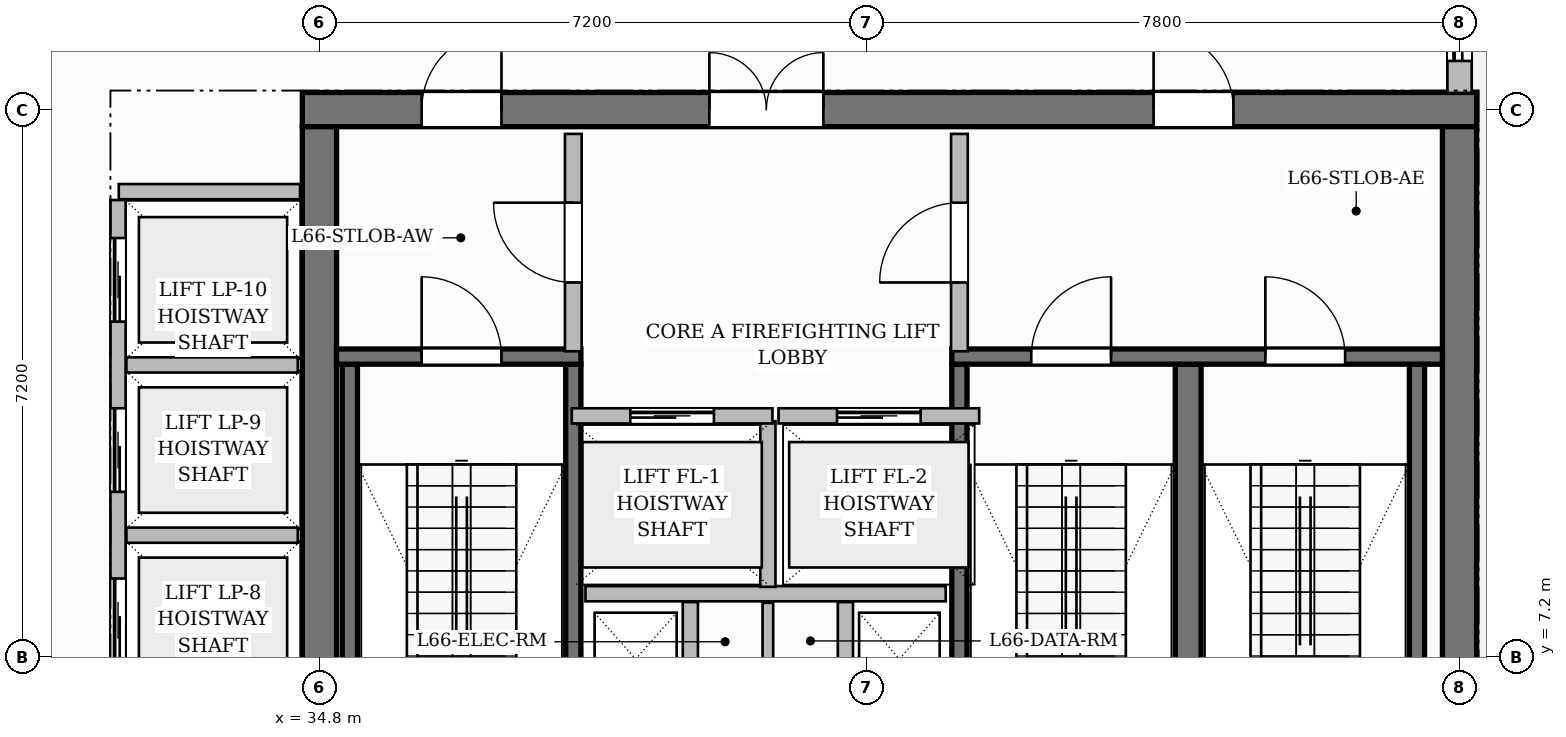
"""IFC4 building model, lengths in metres.
Left out: names, types, materials, properties, quantities, classifications, styles, units other than length and angle.
Written with IfcOpenShell. Run it as: python <this file> out.ifc"""

import sys

from ifc_helpers import new_model, si_unit, direction, frame, frame_2d, origin, place, context, subcontext, project, spatial, rectangle, extrude, source, transform, mapped, element, fill, save


model = new_model("IFC4")
c1 = context("Model", 3, precision=1e-05, world=origin(), true_north=direction((0.0, 1.0)))
c2 = subcontext(c1, "Body", "Model", "MODEL_VIEW")
j1 = project(units=[si_unit("LENGTHUNIT", "METRE"), si_unit("PLANEANGLEUNIT", "RADIAN")], contexts=[c1])
p1 = place(None, origin())
s1 = spatial("IfcSite", under=j1, at=p1, CompositionType="ELEMENT")
p2 = place(p1, origin())
s2 = spatial("IfcBuilding", under=s1, at=p2, CompositionType="ELEMENT")
p3 = place(p2, frame((0.0, 0.0, 263.5)))
s3 = spatial("IfcBuildingStorey", under=s2, at=p3, CompositionType="ELEMENT", Elevation=263.5)
p4 = place(p3, frame((34.575, 14.4, 0.0), z_axis=(0.0, 0.0, 1.0), x_axis=(1.0, 0.0, 0.0)))
e1 = element("IfcWall", 1, at=p4, inside=s3, PredefinedType="SHEAR", context=c2, shape_type="SweptSolid", body=[
    extrude(rectangle(XDim=15.45, YDim=0.45, at=frame_2d((7.725, 0.0))), origin(), (0.0, 0.0, 1.0), 3.85),
])
p5 = place(p4, frame((5.355, 0.0, 0.0)))
e2 = element("IfcOpeningElement", 2, at=p5, cuts=e1, PredefinedType="OPENING", context=c2, shape_type="SweptSolid", body=[
    extrude(rectangle(XDim=1.5, YDim=2.2, at=frame_2d((0.75, 1.1))), frame((0.0, 0.235, 0.0), z_axis=(0.0, -1.0, 0.0), x_axis=(1.0, 0.0, 0.0)), (0.0, 0.0, 1.0), 0.47),
])
p6 = place(p4, frame((1.57, 0.0, 0.0)))
e3 = element("IfcOpeningElement", 3, at=p6, cuts=e1, PredefinedType="OPENING", context=c2, shape_type="SweptSolid", body=[
    extrude(rectangle(XDim=1.05, YDim=2.15, at=frame_2d((0.525, 1.075))), frame((0.0, 0.235, 0.0), z_axis=(0.0, -1.0, 0.0), x_axis=(1.0, 0.0, 0.0)), (0.0, 0.0, 1.0), 0.47),
])
p7 = place(p4, frame((11.2, 0.0, 0.0)))
e4 = element("IfcOpeningElement", 4, at=p7, cuts=e1, PredefinedType="OPENING", context=c2, shape_type="SweptSolid", body=[
    extrude(rectangle(XDim=1.05, YDim=2.15, at=frame_2d((0.525, 1.075))), frame((0.0, 0.235, 0.0), z_axis=(0.0, -1.0, 0.0), x_axis=(1.0, 0.0, 0.0)), (0.0, 0.0, 1.0), 0.47),
])
for number, where, z_axis, x_axis in (
    (5, (34.8, 3.825, 0.0), (0.0, 0.0, 1.0), (0.0, 1.0, 0.0)),
    (6, (49.8, 3.825, 0.0), (0.0, 0.0, 1.0), (0.0, 1.0, 0.0)),
):
    element("IfcWall", number, at=place(p3, frame(where, z_axis=z_axis, x_axis=x_axis)), inside=s3, PredefinedType="SHEAR", context=c2, shape_type="SweptSolid", body=[
        extrude(rectangle(XDim=10.35, YDim=0.45, at=frame_2d((5.175, 0.0))), origin(), (0.0, 0.0, 1.0), 3.85),
    ])
for number, where, z_axis, x_axis in (
    (7, (35.2, 4.1, 0.0), (0.0, 0.0, 1.0), (0.0, 1.0, 0.0)),
    (8, (38.14, 4.1, 0.0), (0.0, 0.0, 1.0), (0.0, 1.0, 0.0)),
):
    element("IfcWall", number, at=place(p3, frame(where, z_axis=z_axis, x_axis=x_axis)), inside=s3, PredefinedType="SHEAR", context=c2, shape_type="SweptSolid", body=[
        extrude(rectangle(XDim=6.95, YDim=0.2, at=frame_2d((3.475, 0.0))), origin(), (0.0, 0.0, 1.0), 3.85),
    ])
p8 = place(p3, frame((35.025, 11.15, 0.0), z_axis=(0.0, 0.0, 1.0), x_axis=(1.0, 0.0, 0.0)))
e9 = element("IfcWall", 9, at=p8, inside=s3, PredefinedType="SHEAR", context=c2, shape_type="SweptSolid", body=[
    extrude(rectangle(XDim=3.215, YDim=0.2, at=frame_2d((1.607, 0.0))), origin(), (0.0, 0.0, 1.0), 3.85),
])
p9 = place(p8, frame((1.12, 0.0, 0.0)))
e10 = element("IfcOpeningElement", 10, at=p9, cuts=e9, PredefinedType="OPENING", context=c2, shape_type="SweptSolid", body=[
    extrude(rectangle(XDim=1.05, YDim=2.2, at=frame_2d((0.525, 1.1))), frame((0.0, 0.11, 0.0), z_axis=(0.0, -1.0, 0.0), x_axis=(1.0, 0.0, 0.0)), (0.0, 0.0, 1.0), 0.22),
])
p10 = place(p3, frame((43.22, 4.1, 0.0), z_axis=(0.0, 0.0, 1.0), x_axis=(0.0, 1.0, 0.0)))
e11 = element("IfcWall", 11, at=p10, inside=s3, PredefinedType="SHEAR", context=c2, shape_type="SweptSolid", body=[
    extrude(rectangle(XDim=6.95, YDim=0.2, at=frame_2d((3.475, 0.0))), origin(), (0.0, 0.0, 1.0), 3.85),
])
p11 = place(p3, frame((46.23, 4.1, 0.0), z_axis=(0.0, 0.0, 1.0), x_axis=(0.0, 1.0, 0.0)))
e12 = element("IfcWall", 12, at=p11, inside=s3, PredefinedType="SHEAR", context=c2, shape_type="SweptSolid", body=[
    extrude(rectangle(XDim=6.95, YDim=0.34, at=frame_2d((3.475, 0.0))), origin(), (0.0, 0.0, 1.0), 3.85),
])
p12 = place(p3, frame((49.24, 4.1, 0.0), z_axis=(0.0, 0.0, 1.0), x_axis=(0.0, 1.0, 0.0)))
e13 = element("IfcWall", 13, at=p12, inside=s3, PredefinedType="SHEAR", context=c2, shape_type="SweptSolid", body=[
    extrude(rectangle(XDim=6.95, YDim=0.2, at=frame_2d((3.475, 0.0))), origin(), (0.0, 0.0, 1.0), 3.85),
])
p13 = place(p3, frame((43.12, 11.15, 0.0), z_axis=(0.0, 0.0, 1.0), x_axis=(1.0, 0.0, 0.0)))
e14 = element("IfcWall", 14, at=p13, inside=s3, PredefinedType="SHEAR", context=c2, shape_type="SweptSolid", body=[
    extrude(rectangle(XDim=6.455, YDim=0.2, at=frame_2d((3.228, 0.0))), origin(), (0.0, 0.0, 1.0), 3.85),
])
p14 = place(p13, frame((1.045, 0.0, 0.0)))
e15 = element("IfcOpeningElement", 15, at=p14, cuts=e14, PredefinedType="OPENING", context=c2, shape_type="SweptSolid", body=[
    extrude(rectangle(XDim=1.05, YDim=2.2, at=frame_2d((0.525, 1.1))), frame((0.0, 0.11, 0.0), z_axis=(0.0, -1.0, 0.0), x_axis=(1.0, 0.0, 0.0)), (0.0, 0.0, 1.0), 0.22),
])
p15 = place(p13, frame((4.125, 0.0, 0.0)))
e16 = element("IfcOpeningElement", 16, at=p15, cuts=e14, PredefinedType="OPENING", context=c2, shape_type="SweptSolid", body=[
    extrude(rectangle(XDim=1.05, YDim=2.2, at=frame_2d((0.525, 1.1))), frame((0.0, 0.11, 0.0), z_axis=(0.0, -1.0, 0.0), x_axis=(1.0, 0.0, 0.0)), (0.0, 0.0, 1.0), 0.22),
])
p16 = place(p3, frame((38.3, 8.03, 0.0), z_axis=(0.0, 0.0, 1.0), x_axis=(1.0, 0.0, 0.0)))
e17 = element("IfcWall", 17, at=p16, inside=s3, PredefinedType="PARTITIONING", context=c2, shape_type="SweptSolid", body=[
    extrude(rectangle(XDim=4.74, YDim=0.2, at=frame_2d((2.37, 0.0))), origin(), (0.0, 0.0, 1.0), 3.6),
])
p17 = place(p3, frame((40.7, 8.12, 0.0), z_axis=(0.0, 0.0, 1.0), x_axis=(0.0, 1.0, 0.0)))
e18 = element("IfcWall", 18, at=p17, inside=s3, PredefinedType="PARTITIONING", context=c2, shape_type="SweptSolid", body=[
    extrude(rectangle(XDim=2.18, YDim=0.2, at=frame_2d((1.09, 0.0))), origin(), (0.0, 0.0, 1.0), 3.6),
])
p18 = place(p3, frame((38.14, 11.22, 0.0), z_axis=(0.0, 0.0, 1.0), x_axis=(0.0, 1.0, 0.0)))
e19 = element("IfcWall", 19, at=p18, inside=s3, PredefinedType="PARTITIONING", context=c2, shape_type="SweptSolid", body=[
    extrude(rectangle(XDim=2.86, YDim=0.22, at=frame_2d((1.43, 0.0))), origin(), (0.0, 0.0, 1.0), 3.6),
])
p19 = place(p18, frame((0.905, 0.0, 0.0)))
e20 = element("IfcOpeningElement", 20, at=p19, cuts=e19, PredefinedType="OPENING", context=c2, shape_type="SweptSolid", body=[
    extrude(rectangle(XDim=1.05, YDim=2.15, at=frame_2d((0.525, 1.075))), frame((0.0, 0.12, 0.0), z_axis=(0.0, -1.0, 0.0), x_axis=(1.0, 0.0, 0.0)), (0.0, 0.0, 1.0), 0.24),
])
p20 = place(p3, frame((43.22, 11.22, 0.0), z_axis=(0.0, 0.0, 1.0), x_axis=(0.0, 1.0, 0.0)))
e21 = element("IfcWall", 21, at=p20, inside=s3, PredefinedType="PARTITIONING", context=c2, shape_type="SweptSolid", body=[
    extrude(rectangle(XDim=2.86, YDim=0.22, at=frame_2d((1.43, 0.0))), origin(), (0.0, 0.0, 1.0), 3.6),
])
p21 = place(p20, frame((0.905, 0.0, 0.0)))
e22 = element("IfcOpeningElement", 22, at=p21, cuts=e21, PredefinedType="OPENING", context=c2, shape_type="SweptSolid", body=[
    extrude(rectangle(XDim=1.05, YDim=2.15, at=frame_2d((0.525, 1.075))), frame((0.0, 0.12, 0.0), z_axis=(0.0, -1.0, 0.0), x_axis=(1.0, 0.0, 0.0)), (0.0, 0.0, 1.0), 0.24),
])
for number, where, z_axis, x_axis in (
    (23, (39.68, 6.13, 0.0), (0.0, 0.0, 1.0), (0.0, 1.0, 0.0)),
    (24, (41.72, 6.13, 0.0), (0.0, 0.0, 1.0), (0.0, 1.0, 0.0)),
):
    element("IfcWall", number, at=place(p3, frame(where, z_axis=z_axis, x_axis=x_axis)), inside=s3, PredefinedType="PARTITIONING", context=c2, shape_type="SweptSolid", body=[
        extrude(rectangle(XDim=1.79, YDim=0.2, at=frame_2d((0.895, 0.0))), origin(), (0.0, 0.0, 1.0), 3.6),
    ])
p22 = place(p3, frame((40.7, 3.845, 0.0), z_axis=(0.0, 0.0, 1.0), x_axis=(0.0, 1.0, 0.0)))
e25 = element("IfcWall", 25, at=p22, inside=s3, PredefinedType="PARTITIONING", context=c2, shape_type="SweptSolid", body=[
    extrude(rectangle(XDim=4.065, YDim=0.14, at=frame_2d((2.032, 0.0))), origin(), (0.0, 0.0, 1.0), 3.6),
])
p23 = place(p3, frame((32.16, 13.32, 0.0), z_axis=(0.0, 0.0, 1.0), x_axis=(1.0, 0.0, 0.0)))
e26 = element("IfcWall", 26, at=p23, inside=s3, PredefinedType="PARTITIONING", context=c2, shape_type="SweptSolid", body=[
    extrude(rectangle(XDim=2.385, YDim=0.2, at=frame_2d((1.192, 0.0))), origin(), (0.0, 0.0, 1.0), 3.6),
])
p24 = place(p3, frame((32.15, 4.39, 0.0), z_axis=(0.0, 0.0, 1.0), x_axis=(0.0, 1.0, 0.0)))
e27 = element("IfcWall", 27, at=p24, inside=s3, PredefinedType="PARTITIONING", context=c2, shape_type="SweptSolid", body=[
    extrude(rectangle(XDim=8.82, YDim=0.2, at=frame_2d((4.41, 0.0))), origin(), (0.0, 0.0, 1.0), 3.6),
])
p25 = place(p24, frame((0.5, 0.0, 0.0)))
e28 = element("IfcOpeningElement", 28, at=p25, cuts=e27, PredefinedType="OPENING", context=c2, shape_type="SweptSolid", body=[
    extrude(rectangle(XDim=1.1, YDim=2.2, at=frame_2d((0.55, 1.1))), frame((0.0, 0.11, 0.0), z_axis=(0.0, -1.0, 0.0), x_axis=(1.0, 0.0, 0.0)), (0.0, 0.0, 1.0), 0.22),
])
p26 = place(p24, frame((2.74, 0.0, 0.0)))
e29 = element("IfcOpeningElement", 29, at=p26, cuts=e27, PredefinedType="OPENING", context=c2, shape_type="SweptSolid", body=[
    extrude(rectangle(XDim=1.1, YDim=2.2, at=frame_2d((0.55, 1.1))), frame((0.0, 0.11, 0.0), z_axis=(0.0, -1.0, 0.0), x_axis=(1.0, 0.0, 0.0)), (0.0, 0.0, 1.0), 0.22),
])
p27 = place(p24, frame((4.98, 0.0, 0.0)))
e30 = element("IfcOpeningElement", 30, at=p27, cuts=e27, PredefinedType="OPENING", context=c2, shape_type="SweptSolid", body=[
    extrude(rectangle(XDim=1.1, YDim=2.2, at=frame_2d((0.55, 1.1))), frame((0.0, 0.11, 0.0), z_axis=(0.0, -1.0, 0.0), x_axis=(1.0, 0.0, 0.0)), (0.0, 0.0, 1.0), 0.22),
])
p28 = place(p24, frame((7.22, 0.0, 0.0)))
e31 = element("IfcOpeningElement", 31, at=p28, cuts=e27, PredefinedType="OPENING", context=c2, shape_type="SweptSolid", body=[
    extrude(rectangle(XDim=1.1, YDim=2.2, at=frame_2d((0.55, 1.1))), frame((0.0, 0.11, 0.0), z_axis=(0.0, -1.0, 0.0), x_axis=(1.0, 0.0, 0.0)), (0.0, 0.0, 1.0), 0.22),
])
for number, where, z_axis, x_axis in (
    (32, (32.26, 8.8, 0.0), (0.0, 0.0, 1.0), (1.0, 0.0, 0.0)),
    (33, (32.26, 11.04, 0.0), (0.0, 0.0, 1.0), (1.0, 0.0, 0.0)),
):
    element("IfcWall", number, at=place(p3, frame(where, z_axis=z_axis, x_axis=x_axis)), inside=s3, PredefinedType="PARTITIONING", context=c2, shape_type="SweptSolid", body=[
        extrude(rectangle(XDim=2.255, YDim=0.2, at=frame_2d((1.127, 0.0))), origin(), (0.0, 0.0, 1.0), 3.6),
    ])
p29 = place(p3, frame((38.12, 10.37, 0.0), z_axis=(0.0, 0.0, 1.0), x_axis=(1.0, 0.0, 0.0)))
e34 = element("IfcWall", 34, at=p29, inside=s3, PredefinedType="PARTITIONING", context=c2, shape_type="SweptSolid", body=[
    extrude(rectangle(XDim=2.64, YDim=0.2, at=frame_2d((1.32, 0.0))), origin(), (0.0, 0.0, 1.0), 3.6),
])
p30 = place(p29, frame((0.77, 0.0, 0.0)))
e35 = element("IfcOpeningElement", 35, at=p30, cuts=e34, PredefinedType="OPENING", context=c2, shape_type="SweptSolid", body=[
    extrude(rectangle(XDim=1.1, YDim=2.2, at=frame_2d((0.55, 1.1))), frame((0.0, 0.11, 0.0), z_axis=(0.0, -1.0, 0.0), x_axis=(1.0, 0.0, 0.0)), (0.0, 0.0, 1.0), 0.22),
])
p31 = place(p3, frame((40.84, 10.37, 0.0), z_axis=(0.0, 0.0, 1.0), x_axis=(1.0, 0.0, 0.0)))
e36 = element("IfcWall", 36, at=p31, inside=s3, PredefinedType="PARTITIONING", context=c2, shape_type="SweptSolid", body=[
    extrude(rectangle(XDim=2.64, YDim=0.2, at=frame_2d((1.32, 0.0))), origin(), (0.0, 0.0, 1.0), 3.6),
])
p32 = place(p31, frame((0.77, 0.0, 0.0)))
e37 = element("IfcOpeningElement", 37, at=p32, cuts=e36, PredefinedType="OPENING", context=c2, shape_type="SweptSolid", body=[
    extrude(rectangle(XDim=1.1, YDim=2.2, at=frame_2d((0.55, 1.1))), frame((0.0, 0.11, 0.0), z_axis=(0.0, -1.0, 0.0), x_axis=(1.0, 0.0, 0.0)), (0.0, 0.0, 1.0), 0.22),
])
p33 = place(p3, frame((49.8, 14.62, 0.0), z_axis=(0.0, 0.0, 1.0), x_axis=(0.0, 1.0, 0.0)))
e38 = element("IfcWall", 38, at=p33, inside=s3, PredefinedType="SOLIDWALL", context=c2, shape_type="SweptSolid", body=[
    extrude(rectangle(XDim=6.93, YDim=0.32, at=frame_2d((3.465, 0.0))), origin(), (0.0, 0.0, 1.0), 3.185),
])
p34 = place(p33, frame((0.42, 0.0, 0.0)))
e39 = element("IfcOpeningElement", 39, at=p34, cuts=e38, PredefinedType="OPENING", context=c2, shape_type="SweptSolid", body=[
    extrude(rectangle(XDim=1.2, YDim=2.2, at=frame_2d((0.6, 1.1))), frame((0.0, 0.17, 0.0), z_axis=(0.0, -1.0, 0.0), x_axis=(1.0, 0.0, 0.0)), (0.0, 0.0, 1.0), 0.34),
])
p35 = place(p33, frame((3.659, 0.0, 0.8)))
e40 = element("IfcOpeningElement", 40, at=p35, cuts=e38, PredefinedType="OPENING", context=c2, shape_type="SweptSolid", body=[
    extrude(rectangle(XDim=1.8, YDim=1.85, at=frame_2d((0.9, 0.925))), frame((0.0, 0.17, 0.0), z_axis=(0.0, -1.0, 0.0), x_axis=(1.0, 0.0, 0.0)), (0.0, 0.0, 1.0), 0.34),
])
m1 = source(origin(), c2, "Body", "SweptSolid", [
    extrude(rectangle(XDim=1.05, YDim=2.2, at=frame_2d((0.525, 1.1))), frame((0.0, 0.025, 0.0), z_axis=(0.0, -1.0, 0.0), x_axis=(1.0, 0.0, 0.0)), (0.0, 0.0, 1.0), 0.05),
])
p36 = place(p9, origin())
e41 = element("IfcDoor", 41, at=p36, inside=s3, OperationType="SINGLE_SWING_LEFT", PredefinedType="DOOR", context=c2, shape_type="MappedRepresentation", body=[
    mapped(m1, transform((0.0, 0.0, 0.0), scale=1.0)),
])
fill(e10, e41)
p37 = place(p14, origin())
e42 = element("IfcDoor", 42, at=p37, inside=s3, OperationType="SINGLE_SWING_RIGHT", PredefinedType="DOOR", context=c2, shape_type="MappedRepresentation", body=[
    mapped(m1, transform((0.0, 0.0, 0.0), scale=1.0)),
])
fill(e15, e42)
p38 = place(p15, origin())
e43 = element("IfcDoor", 43, at=p38, inside=s3, OperationType="SINGLE_SWING_LEFT", PredefinedType="DOOR", context=c2, shape_type="MappedRepresentation", body=[
    mapped(m1, transform((0.0, 0.0, 0.0), scale=1.0)),
])
fill(e16, e43)
m2 = source(origin(), c2, "Body", "SweptSolid", [
    extrude(rectangle(XDim=1.05, YDim=2.15, at=frame_2d((0.525, 1.075))), frame((0.0, 0.025, 0.0), z_axis=(0.0, -1.0, 0.0), x_axis=(1.0, 0.0, 0.0)), (0.0, 0.0, 1.0), 0.05),
])
p39 = place(p19, origin())
e44 = element("IfcDoor", 44, at=p39, inside=s3, OperationType="SINGLE_SWING_RIGHT", PredefinedType="DOOR", context=c2, shape_type="MappedRepresentation", body=[
    mapped(m2, transform((0.0, 0.0, 0.0), scale=1.0)),
])
fill(e20, e44)
p40 = place(p21, origin())
e45 = element("IfcDoor", 45, at=p40, inside=s3, OperationType="SINGLE_SWING_LEFT", PredefinedType="DOOR", context=c2, shape_type="MappedRepresentation", body=[
    mapped(m2, transform((0.0, 0.0, 0.0), scale=1.0)),
])
fill(e22, e45)
m3 = source(origin(), c2, "Body", "SweptSolid", [
    extrude(rectangle(XDim=1.5, YDim=2.2, at=frame_2d((0.75, 1.1))), frame((0.0, 0.025, 0.0), z_axis=(0.0, -1.0, 0.0), x_axis=(1.0, 0.0, 0.0)), (0.0, 0.0, 1.0), 0.05),
])
p41 = place(p5, origin())
e46 = element("IfcDoor", 46, at=p41, inside=s3, OperationType="DOUBLE_DOOR_SINGLE_SWING", PredefinedType="DOOR", context=c2, shape_type="MappedRepresentation", body=[
    mapped(m3, transform((0.0, 0.0, 0.0), scale=1.0)),
])
fill(e2, e46)
p42 = place(p6, origin())
e47 = element("IfcDoor", 47, at=p42, inside=s3, OperationType="SINGLE_SWING_RIGHT", PredefinedType="DOOR", context=c2, shape_type="MappedRepresentation", body=[
    mapped(m2, transform((0.0, 0.0, 0.0), scale=1.0)),
])
fill(e3, e47)
p43 = place(p7, origin())
e48 = element("IfcDoor", 48, at=p43, inside=s3, OperationType="SINGLE_SWING_LEFT", PredefinedType="DOOR", context=c2, shape_type="MappedRepresentation", body=[
    mapped(m2, transform((0.0, 0.0, 0.0), scale=1.0)),
])
fill(e4, e48)
m4 = source(origin(), c2, "Body", "SweptSolid", [
    extrude(rectangle(XDim=1.1, YDim=2.2, at=frame_2d((0.55, 1.1))), frame((0.0, 0.025, 0.0), z_axis=(0.0, -1.0, 0.0), x_axis=(1.0, 0.0, 0.0)), (0.0, 0.0, 1.0), 0.05),
])
p44 = place(p30, origin())
e49 = element("IfcDoor", 49, at=p44, inside=s3, OperationType="SLIDING_TO_LEFT", PredefinedType="DOOR", context=c2, shape_type="MappedRepresentation", body=[
    mapped(m4, transform((0.0, 0.0, 0.0), scale=1.0)),
])
fill(e35, e49)
p45 = place(p32, origin())
e50 = element("IfcDoor", 50, at=p45, inside=s3, OperationType="SLIDING_TO_LEFT", PredefinedType="DOOR", context=c2, shape_type="MappedRepresentation", body=[
    mapped(m4, transform((0.0, 0.0, 0.0), scale=1.0)),
])
fill(e37, e50)
p46 = place(p26, origin())
e51 = element("IfcDoor", 51, at=p46, inside=s3, OperationType="SLIDING_TO_LEFT", PredefinedType="DOOR", context=c2, shape_type="MappedRepresentation", body=[
    mapped(m4, transform((0.0, 0.0, 0.0), scale=1.0)),
])
fill(e29, e51)
p47 = place(p27, origin())
e52 = element("IfcDoor", 52, at=p47, inside=s3, OperationType="SLIDING_TO_LEFT", PredefinedType="DOOR", context=c2, shape_type="MappedRepresentation", body=[
    mapped(m4, transform((0.0, 0.0, 0.0), scale=1.0)),
])
fill(e30, e52)
p48 = place(p28, origin())
e53 = element("IfcDoor", 53, at=p48, inside=s3, OperationType="SLIDING_TO_LEFT", PredefinedType="DOOR", context=c2, shape_type="MappedRepresentation", body=[
    mapped(m4, transform((0.0, 0.0, 0.0), scale=1.0)),
])
fill(e31, e53)
m5 = source(origin(), c2, "Body", "SweptSolid", [
    extrude(rectangle(XDim=1.2, YDim=2.2, at=frame_2d((0.6, 1.1))), frame((0.0, 0.025, 0.0), z_axis=(0.0, -1.0, 0.0), x_axis=(1.0, 0.0, 0.0)), (0.0, 0.0, 1.0), 0.05),
])
p49 = place(p34, origin())
e54 = element("IfcDoor", 54, at=p49, inside=s3, OperationType="SLIDING_TO_LEFT", PredefinedType="DOOR", context=c2, shape_type="MappedRepresentation", body=[
    mapped(m5, transform((0.0, 0.0, 0.0), scale=1.0)),
])
fill(e39, e54)
save(model, sys.argv[1])
